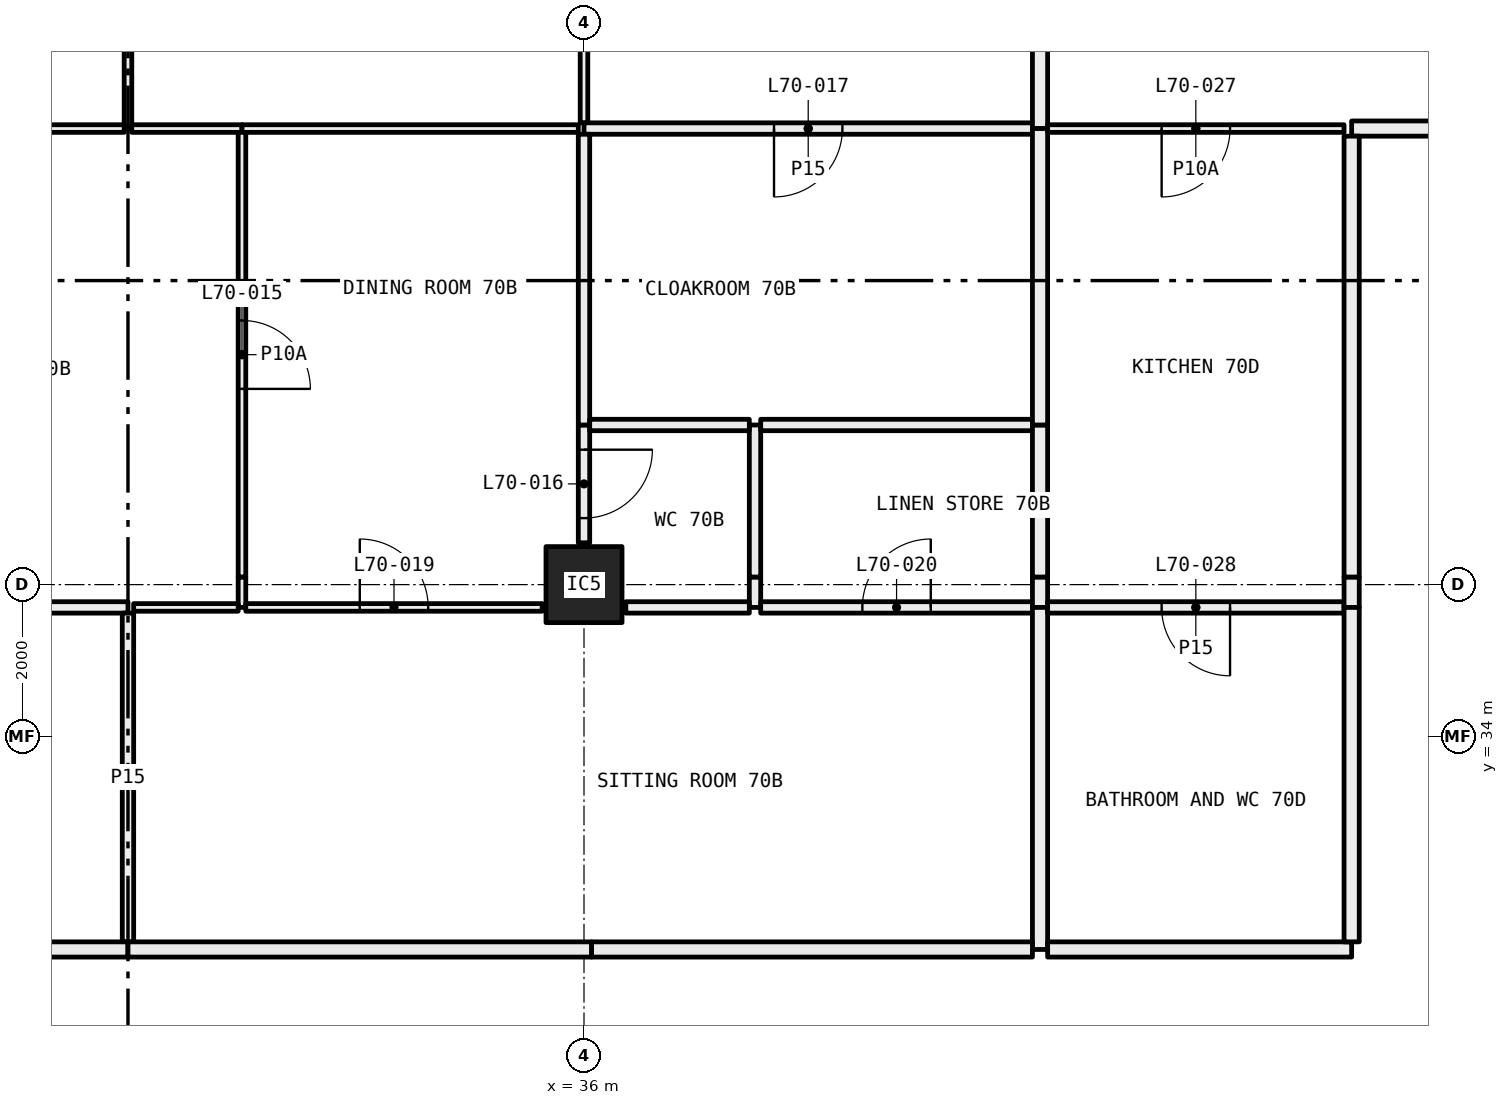
"""IFC4 building model, lengths in metres.
Left out: names, types, materials, properties, quantities, classifications, styles, units other than length and angle.
Written with IfcOpenShell. Run it as: python <this file> out.ifc"""

import sys

from ifc_helpers import new_model, si_unit, direction, frame, frame_2d, origin, origin_2d, place, context, subcontext, project, spatial, rectangle, hollow_rectangle, extrude, element, fill, save


model = new_model("IFC4")
c1 = context("Model", 3, precision=1e-05, world=origin(), true_north=direction((0.0, 1.0)))
c2 = subcontext(c1, "Body", "Model", "MODEL_VIEW")
j1 = project(units=[si_unit("LENGTHUNIT", "METRE"), si_unit("PLANEANGLEUNIT", "RADIAN")], contexts=[c1])
p1 = place(None, origin())
s1 = spatial("IfcSite", under=j1, at=p1, CompositionType="ELEMENT")
p2 = place(p1, origin())
s2 = spatial("IfcBuilding", under=s1, at=p2, CompositionType="ELEMENT")
p3 = place(p2, frame((0.0, 0.0, 259.35)))
s3 = spatial("IfcBuildingStorey", under=s2, at=p3, CompositionType="ELEMENT", Elevation=259.35)
p4 = place(p3, frame((36.0, 36.0, 0.0), z_axis=(0.0, 0.0, 1.0), x_axis=(1.0, 0.0, 0.0)))
e1 = element("IfcColumn", 1, at=p4, inside=s3, PredefinedType="COLUMN", context=c2, shape_type="SweptSolid", body=[
    extrude(hollow_rectangle(XDim=1.0, YDim=1.0, WallThickness=0.04, at=origin_2d()), origin(), (0.0, 0.0, 1.0), 3.05),
])
p5 = place(p3, frame((30.0, 42.0, 0.0), z_axis=(0.0, 0.0, 1.0), x_axis=(0.0, 1.0, 0.0)))
e2 = element("IfcWall", 2, at=p5, inside=s3, PredefinedType="PARTITIONING", context=c2, shape_type="SweptSolid", body=[
    extrude(rectangle(XDim=5.28, YDim=0.1, at=frame_2d((2.64, 0.0))), origin(), (0.0, 0.0, 1.0), 3.05),
])
p6 = place(p5, frame((2.19, 0.0, 0.0)))
e3 = element("IfcOpeningElement", 3, at=p6, cuts=e2, PredefinedType="OPENING", context=c2, shape_type="SweptSolid", body=[
    extrude(rectangle(XDim=0.9, YDim=2.1, at=frame_2d((0.45, 1.05))), frame((0.0, 0.06, 0.0), z_axis=(0.0, -1.0, 0.0), x_axis=(1.0, 0.0, 0.0)), (0.0, 0.0, 1.0), 0.12),
])
p7 = place(p3, frame((26.0, 42.0, 0.0), z_axis=(0.0, 0.0, 1.0), x_axis=(1.0, 0.0, 0.0)))
e4 = element("IfcWall", 4, at=p7, inside=s3, PredefinedType="PARTITIONING", context=c2, shape_type="SweptSolid", body=[
    extrude(rectangle(XDim=3.95, YDim=0.1, at=frame_2d((1.975, 0.0))), origin(), (0.0, 0.0, 1.0), 3.05),
])
p8 = place(p7, frame((1.525, 0.0, 0.0)))
e5 = element("IfcOpeningElement", 5, at=p8, cuts=e4, PredefinedType="OPENING", context=c2, shape_type="SweptSolid", body=[
    extrude(rectangle(XDim=0.9, YDim=2.1, at=frame_2d((0.45, 1.05))), frame((0.0, 0.06, 0.0), z_axis=(0.0, -1.0, 0.0), x_axis=(1.0, 0.0, 0.0)), (0.0, 0.0, 1.0), 0.12),
])
p9 = place(p3, frame((36.0, 42.075, 0.0), z_axis=(0.0, 0.0, 1.0), x_axis=(0.0, 1.0, 0.0)))
e6 = element("IfcWall", 6, at=p9, inside=s3, PredefinedType="PARTITIONING", context=c2, shape_type="SweptSolid", body=[
    extrude(rectangle(XDim=5.205, YDim=0.1, at=frame_2d((2.603, 0.0))), origin(), (0.0, 0.0, 1.0), 2.45),
])
p10 = place(p9, frame((2.153, 0.0, 0.0)))
e7 = element("IfcOpeningElement", 7, at=p10, cuts=e6, PredefinedType="OPENING", context=c2, shape_type="SweptSolid", body=[
    extrude(rectangle(XDim=0.9, YDim=2.1, at=frame_2d((0.45, 1.05))), frame((0.0, 0.06, 0.0), z_axis=(0.0, -1.0, 0.0), x_axis=(1.0, 0.0, 0.0)), (0.0, 0.0, 1.0), 0.12),
])
p11 = place(p3, frame((30.05, 42.0, 0.0), z_axis=(0.0, 0.0, 1.0), x_axis=(1.0, 0.0, 0.0)))
e8 = element("IfcWall", 8, at=p11, inside=s3, PredefinedType="PARTITIONING", context=c2, shape_type="SweptSolid", body=[
    extrude(rectangle(XDim=1.45, YDim=0.1, at=frame_2d((0.725, 0.0))), origin(), (0.0, 0.0, 1.0), 3.05),
])
p12 = place(p3, frame((31.5, 42.0, 0.0), z_axis=(0.0, 0.0, 1.0), x_axis=(1.0, 0.0, 0.0)))
e9 = element("IfcWall", 9, at=p12, inside=s3, PredefinedType="PARTITIONING", context=c2, shape_type="SweptSolid", body=[
    extrude(rectangle(XDim=4.425, YDim=0.1, at=frame_2d((2.212, 0.0))), origin(), (0.0, 0.0, 1.0), 2.45),
])
p13 = place(p3, frame((36.0, 42.0, 0.0), z_axis=(0.0, 0.0, 1.0), x_axis=(1.0, 0.0, 0.0)))
e10 = element("IfcWall", 10, at=p13, inside=s3, PredefinedType="PARTITIONING", context=c2, shape_type="SweptSolid", body=[
    extrude(rectangle(XDim=5.9, YDim=0.15, at=frame_2d((2.95, 0.0))), origin(), (0.0, 0.0, 1.0), 2.45),
])
p14 = place(p13, frame((2.5, 0.0, 0.0)))
e11 = element("IfcOpeningElement", 11, at=p14, cuts=e10, PredefinedType="OPENING", context=c2, shape_type="SweptSolid", body=[
    extrude(rectangle(XDim=0.9, YDim=2.1, at=frame_2d((0.45, 1.05))), frame((0.0, 0.085, 0.0), z_axis=(0.0, -1.0, 0.0), x_axis=(1.0, 0.0, 0.0)), (0.0, 0.0, 1.0), 0.17),
])
p15 = place(p3, frame((42.0, 42.0, 0.0), z_axis=(0.0, 0.0, 1.0), x_axis=(0.0, 1.0, 0.0)))
e12 = element("IfcWall", 12, at=p15, inside=s3, PredefinedType="PARTITIONING", context=c2, shape_type="SweptSolid", body=[
    extrude(rectangle(XDim=5.28, YDim=0.2, at=frame_2d((2.64, 0.0))), origin(), (0.0, 0.0, 1.0), 3.05),
])
p16 = place(p3, frame((31.5, 35.7, 0.0), z_axis=(0.0, 0.0, 1.0), x_axis=(0.0, 1.0, 0.0)))
e13 = element("IfcWall", 13, at=p16, inside=s3, PredefinedType="PARTITIONING", context=c2, shape_type="SweptSolid", body=[
    extrude(rectangle(XDim=0.4, YDim=0.1, at=frame_2d((0.2, 0.0))), origin(), (0.0, 0.0, 1.0), 2.45),
])
p17 = place(p3, frame((31.5, 36.1, 0.0), z_axis=(0.0, 0.0, 1.0), x_axis=(0.0, 1.0, 0.0)))
e14 = element("IfcWall", 14, at=p17, inside=s3, PredefinedType="PARTITIONING", context=c2, shape_type="SweptSolid", body=[
    extrude(rectangle(XDim=5.85, YDim=0.1, at=frame_2d((2.925, 0.0))), origin(), (0.0, 0.0, 1.0), 3.05),
])
p18 = place(p17, frame((2.475, 0.0, 0.0)))
e15 = element("IfcOpeningElement", 15, at=p18, cuts=e14, PredefinedType="OPENING", context=c2, shape_type="SweptSolid", body=[
    extrude(rectangle(XDim=0.9, YDim=2.1, at=frame_2d((0.45, 1.05))), frame((0.0, 0.06, 0.0), z_axis=(0.0, -1.0, 0.0), x_axis=(1.0, 0.0, 0.0)), (0.0, 0.0, 1.0), 0.12),
])
p19 = place(p3, frame((26.0, 35.7, 0.0), z_axis=(0.0, 0.0, 1.0), x_axis=(1.0, 0.0, 0.0)))
e16 = element("IfcWall", 16, at=p19, inside=s3, PredefinedType="PARTITIONING", context=c2, shape_type="SweptSolid", body=[
    extrude(rectangle(XDim=4.0, YDim=0.15, at=frame_2d((2.0, 0.0))), origin(), (0.0, 0.0, 1.0), 3.05),
])
p20 = place(p19, frame((1.55, 0.0, 0.0)))
e17 = element("IfcOpeningElement", 17, at=p20, cuts=e16, PredefinedType="OPENING", context=c2, shape_type="SweptSolid", body=[
    extrude(rectangle(XDim=0.9, YDim=2.1, at=frame_2d((0.45, 1.05))), frame((0.0, 0.085, 0.0), z_axis=(0.0, -1.0, 0.0), x_axis=(1.0, 0.0, 0.0)), (0.0, 0.0, 1.0), 0.17),
])
p21 = place(p3, frame((30.075, 35.7, 0.0), z_axis=(0.0, 0.0, 1.0), x_axis=(1.0, 0.0, 0.0)))
e18 = element("IfcWall", 18, at=p21, inside=s3, PredefinedType="PARTITIONING", context=c2, shape_type="SweptSolid", body=[
    extrude(rectangle(XDim=1.375, YDim=0.1, at=frame_2d((0.688, 0.0))), origin(), (0.0, 0.0, 1.0), 3.05),
])
p22 = place(p3, frame((36.0, 36.55, 0.0), z_axis=(0.0, 0.0, 1.0), x_axis=(0.0, 1.0, 0.0)))
e19 = element("IfcWall", 19, at=p22, inside=s3, PredefinedType="PARTITIONING", context=c2, shape_type="SweptSolid", body=[
    extrude(rectangle(XDim=1.55, YDim=0.15, at=frame_2d((0.775, 0.0))), origin(), (0.0, 0.0, 1.0), 2.45),
])
p23 = place(p22, frame((0.325, 0.0, 0.0)))
e20 = element("IfcOpeningElement", 20, at=p23, cuts=e19, PredefinedType="OPENING", context=c2, shape_type="SweptSolid", body=[
    extrude(rectangle(XDim=0.9, YDim=2.1, at=frame_2d((0.45, 1.05))), frame((0.0, 0.085, 0.0), z_axis=(0.0, -1.0, 0.0), x_axis=(1.0, 0.0, 0.0)), (0.0, 0.0, 1.0), 0.17),
])
p24 = place(p3, frame((36.0, 38.1, 0.0), z_axis=(0.0, 0.0, 1.0), x_axis=(0.0, 1.0, 0.0)))
e21 = element("IfcWall", 21, at=p24, inside=s3, PredefinedType="PARTITIONING", context=c2, shape_type="SweptSolid", body=[
    extrude(rectangle(XDim=3.825, YDim=0.15, at=frame_2d((1.913, 0.0))), origin(), (0.0, 0.0, 1.0), 2.45),
])
p25 = place(p3, frame((31.55, 35.7, 0.0), z_axis=(0.0, 0.0, 1.0), x_axis=(1.0, 0.0, 0.0)))
e22 = element("IfcWall", 22, at=p25, inside=s3, PredefinedType="PARTITIONING", context=c2, shape_type="SweptSolid", body=[
    extrude(rectangle(XDim=3.9, YDim=0.1, at=frame_2d((1.95, 0.0))), origin(), (0.0, 0.0, 1.0), 3.05),
])
p26 = place(p25, frame((1.5, 0.0, 0.0)))
e23 = element("IfcOpeningElement", 23, at=p26, cuts=e22, PredefinedType="OPENING", context=c2, shape_type="SweptSolid", body=[
    extrude(rectangle(XDim=0.9, YDim=2.1, at=frame_2d((0.45, 1.05))), frame((0.0, 0.06, 0.0), z_axis=(0.0, -1.0, 0.0), x_axis=(1.0, 0.0, 0.0)), (0.0, 0.0, 1.0), 0.12),
])
p27 = place(p3, frame((38.25, 35.7, 0.0), z_axis=(0.0, 0.0, 1.0), x_axis=(0.0, 1.0, 0.0)))
e24 = element("IfcWall", 24, at=p27, inside=s3, PredefinedType="PARTITIONING", context=c2, shape_type="SweptSolid", body=[
    extrude(rectangle(XDim=0.4, YDim=0.15, at=frame_2d((0.2, 0.0))), origin(), (0.0, 0.0, 1.0), 2.45),
])
p28 = place(p3, frame((38.25, 36.1, 0.0), z_axis=(0.0, 0.0, 1.0), x_axis=(0.0, 1.0, 0.0)))
e25 = element("IfcWall", 25, at=p28, inside=s3, PredefinedType="PARTITIONING", context=c2, shape_type="SweptSolid", body=[
    extrude(rectangle(XDim=2.0, YDim=0.15, at=frame_2d((1.0, 0.0))), origin(), (0.0, 0.0, 1.0), 3.05),
])
p29 = place(p3, frame((38.175, 38.1, 0.0), z_axis=(0.0, 0.0, 1.0), x_axis=(-1.0, 0.0, 0.0)))
e26 = element("IfcWall", 26, at=p29, inside=s3, PredefinedType="PARTITIONING", context=c2, shape_type="SweptSolid", body=[
    extrude(rectangle(XDim=2.1, YDim=0.15, at=frame_2d((1.05, 0.0))), origin(), (0.0, 0.0, 1.0), 2.45),
])
p30 = place(p3, frame((36.55, 35.7, 0.0), z_axis=(0.0, 0.0, 1.0), x_axis=(1.0, 0.0, 0.0)))
e27 = element("IfcWall", 27, at=p30, inside=s3, PredefinedType="PARTITIONING", context=c2, shape_type="SweptSolid", body=[
    extrude(rectangle(XDim=1.625, YDim=0.15, at=frame_2d((0.812, 0.0))), origin(), (0.0, 0.0, 1.0), 3.05),
])
p31 = place(p3, frame((41.9, 38.1, 0.0), z_axis=(0.0, 0.0, 1.0), x_axis=(-1.0, 0.0, 0.0)))
e28 = element("IfcWall", 28, at=p31, inside=s3, PredefinedType="PARTITIONING", context=c2, shape_type="SweptSolid", body=[
    extrude(rectangle(XDim=3.575, YDim=0.15, at=frame_2d((1.788, 0.0))), origin(), (0.0, 0.0, 1.0), 3.05),
])
p32 = place(p3, frame((38.325, 35.7, 0.0), z_axis=(0.0, 0.0, 1.0), x_axis=(1.0, 0.0, 0.0)))
e29 = element("IfcWall", 29, at=p32, inside=s3, PredefinedType="PARTITIONING", context=c2, shape_type="SweptSolid", body=[
    extrude(rectangle(XDim=3.575, YDim=0.15, at=frame_2d((1.788, 0.0))), origin(), (0.0, 0.0, 1.0), 3.05),
])
p33 = place(p32, frame((1.337, 0.0, 0.0)))
e30 = element("IfcOpeningElement", 30, at=p33, cuts=e29, PredefinedType="OPENING", context=c2, shape_type="SweptSolid", body=[
    extrude(rectangle(XDim=0.9, YDim=2.1, at=frame_2d((0.45, 1.05))), frame((0.0, 0.085, 0.0), z_axis=(0.0, -1.0, 0.0), x_axis=(1.0, 0.0, 0.0)), (0.0, 0.0, 1.0), 0.17),
])
p34 = place(p3, frame((42.0, 35.7, 0.0), z_axis=(0.0, 0.0, 1.0), x_axis=(0.0, 1.0, 0.0)))
e31 = element("IfcWall", 31, at=p34, inside=s3, PredefinedType="PARTITIONING", context=c2, shape_type="SweptSolid", body=[
    extrude(rectangle(XDim=0.4, YDim=0.2, at=frame_2d((0.2, 0.0))), origin(), (0.0, 0.0, 1.0), 2.45),
])
p35 = place(p3, frame((42.0, 36.1, 0.0), z_axis=(0.0, 0.0, 1.0), x_axis=(0.0, 1.0, 0.0)))
e32 = element("IfcWall", 32, at=p35, inside=s3, PredefinedType="PARTITIONING", context=c2, shape_type="SweptSolid", body=[
    extrude(rectangle(XDim=2.0, YDim=0.2, at=frame_2d((1.0, 0.0))), origin(), (0.0, 0.0, 1.0), 3.05),
])
p36 = place(p3, frame((42.0, 38.1, 0.0), z_axis=(0.0, 0.0, 1.0), x_axis=(0.0, 1.0, 0.0)))
e33 = element("IfcWall", 33, at=p36, inside=s3, PredefinedType="PARTITIONING", context=c2, shape_type="SweptSolid", body=[
    extrude(rectangle(XDim=3.9, YDim=0.2, at=frame_2d((1.95, 0.0))), origin(), (0.0, 0.0, 1.0), 3.05),
])
p37 = place(p3, frame((30.0, 31.3, 0.0), z_axis=(0.0, 0.0, 1.0), x_axis=(0.0, 1.0, 0.0)))
e34 = element("IfcWall", 34, at=p37, inside=s3, PredefinedType="PARTITIONING", context=c2, shape_type="SweptSolid", body=[
    extrude(rectangle(XDim=4.325, YDim=0.15, at=frame_2d((2.163, 0.0))), origin(), (0.0, 0.0, 1.0), 3.05),
])
p38 = place(p3, frame((26.0, 31.2, 0.0), z_axis=(0.0, 0.0, 1.0), x_axis=(1.0, 0.0, 0.0)))
e35 = element("IfcWall", 35, at=p38, inside=s3, PredefinedType="PARTITIONING", context=c2, shape_type="SweptSolid", body=[
    extrude(rectangle(XDim=4.0, YDim=0.2, at=frame_2d((2.0, 0.0))), origin(), (0.0, 0.0, 1.0), 3.05),
])
p39 = place(p3, frame((42.0, 31.2, 0.0), z_axis=(0.0, 0.0, 1.0), x_axis=(0.0, 1.0, 0.0)))
e36 = element("IfcWall", 36, at=p39, inside=s3, PredefinedType="PARTITIONING", context=c2, shape_type="SweptSolid", body=[
    extrude(rectangle(XDim=4.5, YDim=0.2, at=frame_2d((2.25, 0.0))), origin(), (0.0, 0.0, 1.0), 3.05),
])
p40 = place(p3, frame((30.0, 31.2, 0.0), z_axis=(0.0, 0.0, 1.0), x_axis=(1.0, 0.0, 0.0)))
e37 = element("IfcWall", 37, at=p40, inside=s3, PredefinedType="PARTITIONING", context=c2, shape_type="SweptSolid", body=[
    extrude(rectangle(XDim=6.1, YDim=0.2, at=frame_2d((3.05, 0.0))), origin(), (0.0, 0.0, 1.0), 2.45),
])
p41 = place(p3, frame((36.1, 31.2, 0.0), z_axis=(0.0, 0.0, 1.0), x_axis=(1.0, 0.0, 0.0)))
e38 = element("IfcWall", 38, at=p41, inside=s3, PredefinedType="PARTITIONING", context=c2, shape_type="SweptSolid", body=[
    extrude(rectangle(XDim=5.8, YDim=0.2, at=frame_2d((2.9, 0.0))), origin(), (0.0, 0.0, 1.0), 3.05),
])
p42 = place(p3, frame((42.1, 42.0, 0.0), z_axis=(0.0, 0.0, 1.0), x_axis=(1.0, 0.0, 0.0)))
e39 = element("IfcWall", 39, at=p42, inside=s3, PredefinedType="PARTITIONING", context=c2, shape_type="SweptSolid", body=[
    extrude(rectangle(XDim=3.9, YDim=0.1, at=frame_2d((1.95, 0.0))), origin(), (0.0, 0.0, 1.0), 3.05),
])
p43 = place(p42, frame((1.5, 0.0, 0.0)))
e40 = element("IfcOpeningElement", 40, at=p43, cuts=e39, PredefinedType="OPENING", context=c2, shape_type="SweptSolid", body=[
    extrude(rectangle(XDim=0.9, YDim=2.1, at=frame_2d((0.45, 1.05))), frame((0.0, 0.06, 0.0), z_axis=(0.0, -1.0, 0.0), x_axis=(1.0, 0.0, 0.0)), (0.0, 0.0, 1.0), 0.12),
])
p44 = place(p3, frame((46.1, 42.0, 0.0), z_axis=(0.0, 0.0, 1.0), x_axis=(1.0, 0.0, 0.0)))
e41 = element("IfcWall", 41, at=p44, inside=s3, PredefinedType="PARTITIONING", context=c2, shape_type="SweptSolid", body=[
    extrude(rectangle(XDim=1.9, YDim=0.2, at=frame_2d((0.95, 0.0))), origin(), (0.0, 0.0, 1.0), 3.05),
])
p45 = place(p3, frame((42.1, 35.7, 0.0), z_axis=(0.0, 0.0, 1.0), x_axis=(1.0, 0.0, 0.0)))
e42 = element("IfcWall", 42, at=p45, inside=s3, PredefinedType="PARTITIONING", context=c2, shape_type="SweptSolid", body=[
    extrude(rectangle(XDim=3.9, YDim=0.15, at=frame_2d((1.95, 0.0))), origin(), (0.0, 0.0, 1.0), 3.05),
])
p46 = place(p45, frame((1.5, 0.0, 0.0)))
e43 = element("IfcOpeningElement", 43, at=p46, cuts=e42, PredefinedType="OPENING", context=c2, shape_type="SweptSolid", body=[
    extrude(rectangle(XDim=0.9, YDim=2.1, at=frame_2d((0.45, 1.05))), frame((0.0, 0.085, 0.0), z_axis=(0.0, -1.0, 0.0), x_axis=(1.0, 0.0, 0.0)), (0.0, 0.0, 1.0), 0.17),
])
p47 = place(p3, frame((46.1, 35.7, 0.0), z_axis=(0.0, 0.0, 1.0), x_axis=(0.0, 1.0, 0.0)))
e44 = element("IfcWall", 44, at=p47, inside=s3, PredefinedType="PARTITIONING", context=c2, shape_type="SweptSolid", body=[
    extrude(rectangle(XDim=0.4, YDim=0.2, at=frame_2d((0.2, 0.0))), origin(), (0.0, 0.0, 1.0), 2.45),
])
p48 = place(p3, frame((46.1, 36.1, 0.0), z_axis=(0.0, 0.0, 1.0), x_axis=(0.0, 1.0, 0.0)))
e45 = element("IfcWall", 45, at=p48, inside=s3, PredefinedType="PARTITIONING", context=c2, shape_type="SweptSolid", body=[
    extrude(rectangle(XDim=5.8, YDim=0.2, at=frame_2d((2.9, 0.0))), origin(), (0.0, 0.0, 1.0), 3.05),
])
p49 = place(p3, frame((42.1, 31.2, 0.0), z_axis=(0.0, 0.0, 1.0), x_axis=(1.0, 0.0, 0.0)))
e46 = element("IfcWall", 46, at=p49, inside=s3, PredefinedType="PARTITIONING", context=c2, shape_type="SweptSolid", body=[
    extrude(rectangle(XDim=4.0, YDim=0.2, at=frame_2d((2.0, 0.0))), origin(), (0.0, 0.0, 1.0), 3.05),
])
p50 = place(p3, frame((46.1, 31.3, 0.0), z_axis=(0.0, 0.0, 1.0), x_axis=(0.0, 1.0, 0.0)))
e47 = element("IfcWall", 47, at=p50, inside=s3, PredefinedType="PARTITIONING", context=c2, shape_type="SweptSolid", body=[
    extrude(rectangle(XDim=4.4, YDim=0.2, at=frame_2d((2.2, 0.0))), origin(), (0.0, 0.0, 1.0), 3.05),
])
p51 = place(p18, frame((0.9, 0.0, 0.0), x_axis=(-1.0, 0.0, 0.0)))
e48 = element("IfcDoor", 48, at=p51, inside=s3, OperationType="SINGLE_SWING_LEFT", PredefinedType="DOOR", context=c2, shape_type="SweptSolid", body=[
    extrude(rectangle(XDim=0.9, YDim=2.1, at=frame_2d((0.45, 1.05))), frame((0.0, 0.025, 0.0), z_axis=(0.0, -1.0, 0.0), x_axis=(1.0, 0.0, 0.0)), (0.0, 0.0, 1.0), 0.05),
])
fill(e15, e48)
p52 = place(p23, frame((0.9, 0.0, 0.0), x_axis=(-1.0, 0.0, 0.0)))
e49 = element("IfcDoor", 49, at=p52, inside=s3, OperationType="SINGLE_SWING_RIGHT", PredefinedType="DOOR", context=c2, shape_type="SweptSolid", body=[
    extrude(rectangle(XDim=0.9, YDim=2.1, at=frame_2d((0.45, 1.05))), frame((0.0, 0.025, 0.0), z_axis=(0.0, -1.0, 0.0), x_axis=(1.0, 0.0, 0.0)), (0.0, 0.0, 1.0), 0.05),
])
fill(e20, e49)
p53 = place(p14, frame((0.9, 0.0, 0.0), x_axis=(-1.0, 0.0, 0.0)))
e50 = element("IfcDoor", 50, at=p53, inside=s3, OperationType="SINGLE_SWING_LEFT", PredefinedType="DOOR", context=c2, shape_type="SweptSolid", body=[
    extrude(rectangle(XDim=0.9, YDim=2.1, at=frame_2d((0.45, 1.05))), frame((0.0, 0.025, 0.0), z_axis=(0.0, -1.0, 0.0), x_axis=(1.0, 0.0, 0.0)), (0.0, 0.0, 1.0), 0.05),
])
fill(e11, e50)
p54 = place(p26, origin())
e51 = element("IfcDoor", 51, at=p54, inside=s3, OperationType="SINGLE_SWING_RIGHT", PredefinedType="DOOR", context=c2, shape_type="SweptSolid", body=[
    extrude(rectangle(XDim=0.9, YDim=2.1, at=frame_2d((0.45, 1.05))), frame((0.0, 0.025, 0.0), z_axis=(0.0, -1.0, 0.0), x_axis=(1.0, 0.0, 0.0)), (0.0, 0.0, 1.0), 0.05),
])
fill(e23, e51)
p55 = place(p33, origin())
e52 = element("IfcDoor", 52, at=p55, inside=s3, OperationType="SINGLE_SWING_LEFT", PredefinedType="DOOR", context=c2, shape_type="SweptSolid", body=[
    extrude(rectangle(XDim=0.9, YDim=2.1, at=frame_2d((0.45, 1.05))), frame((0.0, 0.025, 0.0), z_axis=(0.0, -1.0, 0.0), x_axis=(1.0, 0.0, 0.0)), (0.0, 0.0, 1.0), 0.05),
])
fill(e30, e52)
p56 = place(p43, frame((0.9, 0.0, 0.0), x_axis=(-1.0, 0.0, 0.0)))
e53 = element("IfcDoor", 53, at=p56, inside=s3, OperationType="SINGLE_SWING_LEFT", PredefinedType="DOOR", context=c2, shape_type="SweptSolid", body=[
    extrude(rectangle(XDim=0.9, YDim=2.1, at=frame_2d((0.45, 1.05))), frame((0.0, 0.025, 0.0), z_axis=(0.0, -1.0, 0.0), x_axis=(1.0, 0.0, 0.0)), (0.0, 0.0, 1.0), 0.05),
])
fill(e40, e53)
p57 = place(p46, frame((0.9, 0.0, 0.0), x_axis=(-1.0, 0.0, 0.0)))
e54 = element("IfcDoor", 54, at=p57, inside=s3, OperationType="SINGLE_SWING_RIGHT", PredefinedType="DOOR", context=c2, shape_type="SweptSolid", body=[
    extrude(rectangle(XDim=0.9, YDim=2.1, at=frame_2d((0.45, 1.05))), frame((0.0, 0.025, 0.0), z_axis=(0.0, -1.0, 0.0), x_axis=(1.0, 0.0, 0.0)), (0.0, 0.0, 1.0), 0.05),
])
fill(e43, e54)
save(model, sys.argv[1])
